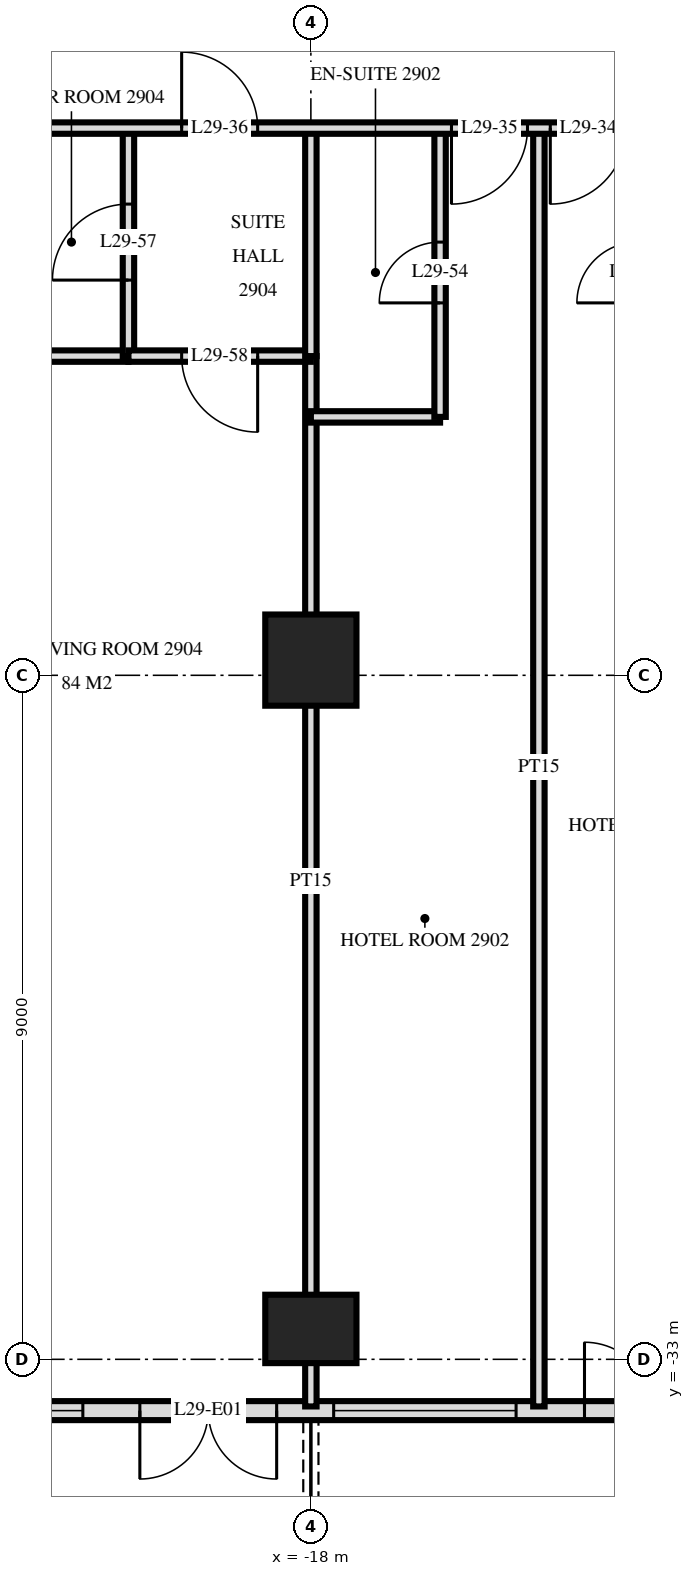
"""IFC4 building model, lengths in metres.
Left out: names, types, materials, properties, quantities, classifications, styles, units other than length and angle.
Written with IfcOpenShell. Run it as: python <this file> out.ifc"""

import sys

from ifc_helpers import new_model, si_unit, direction, frame, frame_2d, origin, origin_2d, place, context, subcontext, project, spatial, rectangle, extrude, element, fill, save


model = new_model("IFC4")
c1 = context("Model", 3, precision=1e-05, world=origin(), true_north=direction((0.0, 1.0)))
c2 = subcontext(c1, "Body", "Model", "MODEL_VIEW")
j1 = project(units=[si_unit("LENGTHUNIT", "METRE"), si_unit("PLANEANGLEUNIT", "RADIAN")], contexts=[c1])
p1 = place(None, origin())
s1 = spatial("IfcSite", under=j1, at=p1, CompositionType="ELEMENT")
p2 = place(p1, origin())
s2 = spatial("IfcBuilding", under=s1, at=p2, CompositionType="ELEMENT")
p3 = place(p2, frame((0.0, 0.0, 116.4)))
s3 = spatial("IfcBuildingStorey", under=s2, at=p3, CompositionType="ELEMENT", Elevation=116.4)
p4 = place(p3, frame((-18.0, -32.6, 0.0), z_axis=(0.0, 0.0, 1.0), x_axis=(1.0, 0.0, 0.0)))
e1 = element("IfcColumn", 1, at=p4, inside=s3, PredefinedType="COLUMN", context=c2, shape_type="SweptSolid", body=[
    extrude(rectangle(XDim=1.2, YDim=0.9, at=origin_2d()), origin(), (0.0, 0.0, 1.0), 3.6),
])
p5 = place(p3, frame((-18.0, -23.8, 0.0), z_axis=(0.0, 0.0, 1.0), x_axis=(1.0, 0.0, 0.0)))
e2 = element("IfcColumn", 2, at=p5, inside=s3, PredefinedType="COLUMN", context=c2, shape_type="SweptSolid", body=[
    extrude(rectangle(XDim=1.2, YDim=1.2, at=origin_2d()), origin(), (0.0, 0.0, 1.0), 3.6),
])
p6 = place(p3, frame((-23.675, -33.675, 0.0), z_axis=(0.0, 0.0, 1.0), x_axis=(1.0, 0.0, 0.0)))
e3 = element("IfcWall", 3, at=p6, inside=s3, PredefinedType="SOLIDWALL", context=c2, shape_type="SweptSolid", body=[
    extrude(rectangle(XDim=47.351, YDim=0.25, at=frame_2d((23.675, 0.0))), origin(), (0.0, 0.0, 1.0), 3.32),
])
p7 = place(p6, frame((0.275, 0.0, 0.3)))
e4 = element("IfcOpeningElement", 4, at=p7, cuts=e3, PredefinedType="OPENING", context=c2, shape_type="SweptSolid", body=[
    extrude(rectangle(XDim=2.4, YDim=2.1, at=frame_2d((1.2, 1.05))), frame((0.0, 0.135, 0.0), z_axis=(0.0, -1.0, 0.0), x_axis=(1.0, 0.0, 0.0)), (0.0, 0.0, 1.0), 0.27),
])
p8 = place(p6, frame((3.425, 0.0, 0.0)))
e5 = element("IfcOpeningElement", 5, at=p8, cuts=e3, PredefinedType="OPENING", context=c2, shape_type="SweptSolid", body=[
    extrude(rectangle(XDim=1.8, YDim=2.4, at=frame_2d((0.9, 1.2))), frame((0.0, 0.135, 0.0), z_axis=(0.0, -1.0, 0.0), x_axis=(1.0, 0.0, 0.0)), (0.0, 0.0, 1.0), 0.27),
])
p9 = place(p6, frame((5.975, 0.0, 0.3)))
e6 = element("IfcOpeningElement", 6, at=p9, cuts=e3, PredefinedType="OPENING", context=c2, shape_type="SweptSolid", body=[
    extrude(rectangle(XDim=2.4, YDim=2.1, at=frame_2d((1.2, 1.05))), frame((0.0, 0.135, 0.0), z_axis=(0.0, -1.0, 0.0), x_axis=(1.0, 0.0, 0.0)), (0.0, 0.0, 1.0), 0.27),
])
p10 = place(p6, frame((9.275, 0.0, 0.0)))
e7 = element("IfcOpeningElement", 7, at=p10, cuts=e3, PredefinedType="OPENING", context=c2, shape_type="SweptSolid", body=[
    extrude(rectangle(XDim=1.8, YDim=2.4, at=frame_2d((0.9, 1.2))), frame((0.0, 0.135, 0.0), z_axis=(0.0, -1.0, 0.0), x_axis=(1.0, 0.0, 0.0)), (0.0, 0.0, 1.0), 0.27),
])
p11 = place(p6, frame((12.275, 0.0, 0.0)))
e8 = element("IfcOpeningElement", 8, at=p11, cuts=e3, PredefinedType="OPENING", context=c2, shape_type="SweptSolid", body=[
    extrude(rectangle(XDim=1.8, YDim=2.4, at=frame_2d((0.9, 1.2))), frame((0.0, 0.135, 0.0), z_axis=(0.0, -1.0, 0.0), x_axis=(1.0, 0.0, 0.0)), (0.0, 0.0, 1.0), 0.27),
])
p12 = place(p6, frame((14.975, 0.0, 0.3)))
e9 = element("IfcOpeningElement", 9, at=p12, cuts=e3, PredefinedType="OPENING", context=c2, shape_type="SweptSolid", body=[
    extrude(rectangle(XDim=2.4, YDim=2.1, at=frame_2d((1.2, 1.05))), frame((0.0, 0.135, 0.0), z_axis=(0.0, -1.0, 0.0), x_axis=(1.0, 0.0, 0.0)), (0.0, 0.0, 1.0), 0.27),
])
p13 = place(p6, frame((17.975, 0.0, 0.3)))
e10 = element("IfcOpeningElement", 10, at=p13, cuts=e3, PredefinedType="OPENING", context=c2, shape_type="SweptSolid", body=[
    extrude(rectangle(XDim=2.4, YDim=2.1, at=frame_2d((1.2, 1.05))), frame((0.0, 0.135, 0.0), z_axis=(0.0, -1.0, 0.0), x_axis=(1.0, 0.0, 0.0)), (0.0, 0.0, 1.0), 0.27),
])
p14 = place(p6, frame((21.275, 0.0, 0.0)))
e11 = element("IfcOpeningElement", 11, at=p14, cuts=e3, PredefinedType="OPENING", context=c2, shape_type="SweptSolid", body=[
    extrude(rectangle(XDim=1.8, YDim=2.4, at=frame_2d((0.9, 1.2))), frame((0.0, 0.135, 0.0), z_axis=(0.0, -1.0, 0.0), x_axis=(1.0, 0.0, 0.0)), (0.0, 0.0, 1.0), 0.27),
])
p15 = place(p6, frame((24.275, 0.0, 0.0)))
e12 = element("IfcOpeningElement", 12, at=p15, cuts=e3, PredefinedType="OPENING", context=c2, shape_type="SweptSolid", body=[
    extrude(rectangle(XDim=1.8, YDim=2.4, at=frame_2d((0.9, 1.2))), frame((0.0, 0.135, 0.0), z_axis=(0.0, -1.0, 0.0), x_axis=(1.0, 0.0, 0.0)), (0.0, 0.0, 1.0), 0.27),
])
p16 = place(p6, frame((26.975, 0.0, 0.3)))
e13 = element("IfcOpeningElement", 13, at=p16, cuts=e3, PredefinedType="OPENING", context=c2, shape_type="SweptSolid", body=[
    extrude(rectangle(XDim=2.4, YDim=2.1, at=frame_2d((1.2, 1.05))), frame((0.0, 0.135, 0.0), z_axis=(0.0, -1.0, 0.0), x_axis=(1.0, 0.0, 0.0)), (0.0, 0.0, 1.0), 0.27),
])
p17 = place(p6, frame((30.275, 0.0, 0.0)))
e14 = element("IfcOpeningElement", 14, at=p17, cuts=e3, PredefinedType="OPENING", context=c2, shape_type="SweptSolid", body=[
    extrude(rectangle(XDim=1.8, YDim=2.4, at=frame_2d((0.9, 1.2))), frame((0.0, 0.135, 0.0), z_axis=(0.0, -1.0, 0.0), x_axis=(1.0, 0.0, 0.0)), (0.0, 0.0, 1.0), 0.27),
])
p18 = place(p6, frame((32.975, 0.0, 0.3)))
e15 = element("IfcOpeningElement", 15, at=p18, cuts=e3, PredefinedType="OPENING", context=c2, shape_type="SweptSolid", body=[
    extrude(rectangle(XDim=2.4, YDim=2.1, at=frame_2d((1.2, 1.05))), frame((0.0, 0.135, 0.0), z_axis=(0.0, -1.0, 0.0), x_axis=(1.0, 0.0, 0.0)), (0.0, 0.0, 1.0), 0.27),
])
p19 = place(p6, frame((35.975, 0.0, 0.3)))
e16 = element("IfcOpeningElement", 16, at=p19, cuts=e3, PredefinedType="OPENING", context=c2, shape_type="SweptSolid", body=[
    extrude(rectangle(XDim=2.4, YDim=2.1, at=frame_2d((1.2, 1.05))), frame((0.0, 0.135, 0.0), z_axis=(0.0, -1.0, 0.0), x_axis=(1.0, 0.0, 0.0)), (0.0, 0.0, 1.0), 0.27),
])
p20 = place(p6, frame((39.275, 0.0, 0.0)))
e17 = element("IfcOpeningElement", 17, at=p20, cuts=e3, PredefinedType="OPENING", context=c2, shape_type="SweptSolid", body=[
    extrude(rectangle(XDim=1.8, YDim=2.4, at=frame_2d((0.9, 1.2))), frame((0.0, 0.135, 0.0), z_axis=(0.0, -1.0, 0.0), x_axis=(1.0, 0.0, 0.0)), (0.0, 0.0, 1.0), 0.27),
])
p21 = place(p6, frame((41.975, 0.0, 0.3)))
e18 = element("IfcOpeningElement", 18, at=p21, cuts=e3, PredefinedType="OPENING", context=c2, shape_type="SweptSolid", body=[
    extrude(rectangle(XDim=2.4, YDim=2.1, at=frame_2d((1.2, 1.05))), frame((0.0, 0.135, 0.0), z_axis=(0.0, -1.0, 0.0), x_axis=(1.0, 0.0, 0.0)), (0.0, 0.0, 1.0), 0.27),
])
p22 = place(p6, frame((45.125, 0.0, 0.0)))
e19 = element("IfcOpeningElement", 19, at=p22, cuts=e3, PredefinedType="OPENING", context=c2, shape_type="SweptSolid", body=[
    extrude(rectangle(XDim=1.8, YDim=2.4, at=frame_2d((0.9, 1.2))), frame((0.0, 0.135, 0.0), z_axis=(0.0, -1.0, 0.0), x_axis=(1.0, 0.0, 0.0)), (0.0, 0.0, 1.0), 0.27),
])
p23 = place(p3, frame((-15.0, -33.62, 0.0), z_axis=(0.0, 0.0, 1.0), x_axis=(0.0, 1.0, 0.0)))
e20 = element("IfcWall", 20, at=p23, inside=s3, PredefinedType="PARTITIONING", context=c2, shape_type="SweptSolid", body=[
    extrude(rectangle(XDim=16.82, YDim=0.15, at=frame_2d((8.41, 0.0))), origin(), (0.0, 0.0, 1.0), 3.32),
])
p24 = place(p3, frame((-16.3, -20.6, 0.0), z_axis=(0.0, 0.0, 1.0), x_axis=(0.0, 1.0, 0.0)))
e21 = element("IfcWall", 21, at=p24, inside=s3, PredefinedType="PARTITIONING", context=c2, shape_type="SweptSolid", body=[
    extrude(rectangle(XDim=3.8, YDim=0.15, at=frame_2d((1.9, 0.0))), origin(), (0.0, 0.0, 1.0), 3.32),
])
p25 = place(p24, frame((1.5, 0.0, 0.0)))
e22 = element("IfcOpeningElement", 22, at=p25, cuts=e21, PredefinedType="OPENING", context=c2, shape_type="SweptSolid", body=[
    extrude(rectangle(XDim=0.8, YDim=2.1, at=frame_2d((0.4, 1.05))), frame((0.0, 0.085, 0.0), z_axis=(0.0, -1.0, 0.0), x_axis=(1.0, 0.0, 0.0)), (0.0, 0.0, 1.0), 0.17),
])
p26 = place(p3, frame((-18.0, -19.8, 0.0), z_axis=(0.0, 0.0, 1.0), x_axis=(0.0, 1.0, 0.0)))
e23 = element("IfcWall", 23, at=p26, inside=s3, PredefinedType="PARTITIONING", context=c2, shape_type="SweptSolid", body=[
    extrude(rectangle(XDim=3.0, YDim=0.15, at=frame_2d((1.5, 0.0))), origin(), (0.0, 0.0, 1.0), 3.32),
])
p27 = place(p3, frame((-18.0, -33.62, 0.0), z_axis=(0.0, 0.0, 1.0), x_axis=(0.0, 1.0, 0.0)))
e24 = element("IfcWall", 24, at=p27, inside=s3, PredefinedType="PARTITIONING", context=c2, shape_type="SweptSolid", body=[
    extrude(rectangle(XDim=13.82, YDim=0.15, at=frame_2d((6.91, 0.0))), origin(), (0.0, 0.0, 1.0), 3.32),
])
p28 = place(p3, frame((-20.4, -19.8, 0.0), z_axis=(0.0, 0.0, 1.0), x_axis=(0.0, 1.0, 0.0)))
e25 = element("IfcWall", 25, at=p28, inside=s3, PredefinedType="PARTITIONING", context=c2, shape_type="SweptSolid", body=[
    extrude(rectangle(XDim=3.0, YDim=0.15, at=frame_2d((1.5, 0.0))), origin(), (0.0, 0.0, 1.0), 3.32),
])
p29 = place(p28, frame((1.0, 0.0, 0.0)))
e26 = element("IfcOpeningElement", 26, at=p29, cuts=e25, PredefinedType="OPENING", context=c2, shape_type="SweptSolid", body=[
    extrude(rectangle(XDim=1.0, YDim=2.1, at=frame_2d((0.5, 1.05))), frame((0.0, 0.085, 0.0), z_axis=(0.0, -1.0, 0.0), x_axis=(1.0, 0.0, 0.0)), (0.0, 0.0, 1.0), 0.17),
])
p30 = place(p3, frame((-18.0, -20.6, 0.0), z_axis=(0.0, 0.0, 1.0), x_axis=(1.0, 0.0, 0.0)))
e27 = element("IfcWall", 27, at=p30, inside=s3, PredefinedType="PARTITIONING", context=c2, shape_type="SweptSolid", body=[
    extrude(rectangle(XDim=1.7, YDim=0.15, at=frame_2d((0.85, 0.0))), origin(), (0.0, 0.0, 1.0), 3.32),
])
p31 = place(p3, frame((-20.4, -19.8, 0.0), z_axis=(0.0, 0.0, 1.0), x_axis=(1.0, 0.0, 0.0)))
e28 = element("IfcWall", 28, at=p31, inside=s3, PredefinedType="PARTITIONING", context=c2, shape_type="SweptSolid", body=[
    extrude(rectangle(XDim=2.4, YDim=0.15, at=frame_2d((1.2, 0.0))), origin(), (0.0, 0.0, 1.0), 3.32),
])
p32 = place(p31, frame((0.7, 0.0, 0.0)))
e29 = element("IfcOpeningElement", 29, at=p32, cuts=e28, PredefinedType="OPENING", context=c2, shape_type="SweptSolid", body=[
    extrude(rectangle(XDim=1.0, YDim=2.1, at=frame_2d((0.5, 1.05))), frame((0.0, 0.085, 0.0), z_axis=(0.0, -1.0, 0.0), x_axis=(1.0, 0.0, 0.0)), (0.0, 0.0, 1.0), 0.17),
])
p33 = place(p3, frame((-21.9, -19.8, 0.0), z_axis=(0.0, 0.0, 1.0), x_axis=(1.0, 0.0, 0.0)))
e30 = element("IfcWall", 30, at=p33, inside=s3, PredefinedType="PLUMBINGWALL", context=c2, shape_type="SweptSolid", body=[
    extrude(rectangle(XDim=1.5, YDim=0.15, at=frame_2d((0.75, 0.0))), origin(), (0.0, 0.0, 1.0), 3.32),
])
p34 = place(p3, frame((-28.02, -16.8, 0.0), z_axis=(0.0, 0.0, 1.0), x_axis=(1.0, 0.0, 0.0)))
e31 = element("IfcWall", 31, at=p34, inside=s3, PredefinedType="PARTITIONING", context=c2, shape_type="SweptSolid", body=[
    extrude(rectangle(XDim=56.04, YDim=0.15, at=frame_2d((28.02, 0.0))), origin(), (0.0, 0.0, 1.0), 3.32),
])
p35 = place(p34, frame((13.17, 0.0, 0.0)))
e32 = element("IfcOpeningElement", 32, at=p35, cuts=e31, PredefinedType="OPENING", context=c2, shape_type="SweptSolid", body=[
    extrude(rectangle(XDim=1.0, YDim=2.1, at=frame_2d((0.5, 1.05))), frame((0.0, 0.085, 0.0), z_axis=(0.0, -1.0, 0.0), x_axis=(1.0, 0.0, 0.0)), (0.0, 0.0, 1.0), 0.17),
])
p36 = place(p34, frame((11.87, 0.0, 0.0)))
e33 = element("IfcOpeningElement", 33, at=p36, cuts=e31, PredefinedType="OPENING", context=c2, shape_type="SweptSolid", body=[
    extrude(rectangle(XDim=1.0, YDim=2.1, at=frame_2d((0.5, 1.05))), frame((0.0, 0.085, 0.0), z_axis=(0.0, -1.0, 0.0), x_axis=(1.0, 0.0, 0.0)), (0.0, 0.0, 1.0), 0.17),
])
p37 = place(p34, frame((8.32, 0.0, 0.0)))
e34 = element("IfcOpeningElement", 34, at=p37, cuts=e31, PredefinedType="OPENING", context=c2, shape_type="SweptSolid", body=[
    extrude(rectangle(XDim=1.0, YDim=2.1, at=frame_2d((0.5, 1.05))), frame((0.0, 0.085, 0.0), z_axis=(0.0, -1.0, 0.0), x_axis=(1.0, 0.0, 0.0)), (0.0, 0.0, 1.0), 0.17),
])
p38 = place(p34, frame((40.42, 0.0, 0.0)))
e35 = element("IfcOpeningElement", 35, at=p38, cuts=e31, PredefinedType="OPENING", context=c2, shape_type="SweptSolid", body=[
    extrude(rectangle(XDim=1.0, YDim=2.1, at=frame_2d((0.5, 1.05))), frame((0.0, 0.085, 0.0), z_axis=(0.0, -1.0, 0.0), x_axis=(1.0, 0.0, 0.0)), (0.0, 0.0, 1.0), 0.17),
])
p39 = place(p34, frame((46.72, 0.0, 0.0)))
e36 = element("IfcOpeningElement", 36, at=p39, cuts=e31, PredefinedType="OPENING", context=c2, shape_type="SweptSolid", body=[
    extrude(rectangle(XDim=1.0, YDim=2.1, at=frame_2d((0.5, 1.05))), frame((0.0, 0.085, 0.0), z_axis=(0.0, -1.0, 0.0), x_axis=(1.0, 0.0, 0.0)), (0.0, 0.0, 1.0), 0.17),
])
p40 = place(p34, frame((21.52, 0.0, 0.0)))
e37 = element("IfcOpeningElement", 37, at=p40, cuts=e31, PredefinedType="OPENING", context=c2, shape_type="SweptSolid", body=[
    extrude(rectangle(XDim=1.0, YDim=2.1, at=frame_2d((0.5, 1.05))), frame((0.0, 0.085, 0.0), z_axis=(0.0, -1.0, 0.0), x_axis=(1.0, 0.0, 0.0)), (0.0, 0.0, 1.0), 0.17),
])
p41 = place(p34, frame((30.52, 0.0, 0.0)))
e38 = element("IfcOpeningElement", 38, at=p41, cuts=e31, PredefinedType="OPENING", context=c2, shape_type="SweptSolid", body=[
    extrude(rectangle(XDim=1.0, YDim=2.1, at=frame_2d((0.5, 1.05))), frame((0.0, 0.085, 0.0), z_axis=(0.0, -1.0, 0.0), x_axis=(1.0, 0.0, 0.0)), (0.0, 0.0, 1.0), 0.17),
])
p42 = place(p34, frame((36.52, 0.0, 0.0)))
e39 = element("IfcOpeningElement", 39, at=p42, cuts=e31, PredefinedType="OPENING", context=c2, shape_type="SweptSolid", body=[
    extrude(rectangle(XDim=1.0, YDim=2.1, at=frame_2d((0.5, 1.05))), frame((0.0, 0.085, 0.0), z_axis=(0.0, -1.0, 0.0), x_axis=(1.0, 0.0, 0.0)), (0.0, 0.0, 1.0), 0.17),
])
p43 = place(p7, origin())
e40 = element("IfcWindow", 40, at=p43, inside=s3, PartitioningType="SINGLE_PANEL", PredefinedType="WINDOW", context=c2, shape_type="SweptSolid", body=[
    extrude(rectangle(XDim=2.4, YDim=2.1, at=frame_2d((1.2, 1.05))), frame((0.0, 0.03, 0.0), z_axis=(0.0, -1.0, 0.0), x_axis=(1.0, 0.0, 0.0)), (0.0, 0.0, 1.0), 0.06),
])
fill(e4, e40)
p44 = place(p8, frame((0.9, 0.0, 0.0), z_axis=(0.0, 0.0, 1.0), x_axis=(-1.0, 0.0, 0.0)))
e41 = element("IfcDoor", 41, at=p44, inside=s3, OperationType="DOUBLE_DOOR_SINGLE_SWING", PredefinedType="DOOR", context=c2, shape_type="SweptSolid", body=[
    extrude(rectangle(XDim=1.8, YDim=2.4, at=frame_2d((0.0, 1.2))), frame((0.0, -0.025, 0.0), z_axis=(0.0, 1.0, 0.0), x_axis=(-1.0, 0.0, 0.0)), (0.0, 0.0, 1.0), 0.05),
])
fill(e5, e41)
p45 = place(p9, origin())
e42 = element("IfcWindow", 42, at=p45, inside=s3, PartitioningType="SINGLE_PANEL", PredefinedType="WINDOW", context=c2, shape_type="SweptSolid", body=[
    extrude(rectangle(XDim=2.4, YDim=2.1, at=frame_2d((1.2, 1.05))), frame((0.0, 0.03, 0.0), z_axis=(0.0, -1.0, 0.0), x_axis=(1.0, 0.0, 0.0)), (0.0, 0.0, 1.0), 0.06),
])
fill(e6, e42)
p46 = place(p10, origin())
e43 = element("IfcDoor", 43, at=p46, inside=s3, OperationType="DOUBLE_DOOR_SINGLE_SWING", PredefinedType="DOOR", context=c2, shape_type="SweptSolid", body=[
    extrude(rectangle(XDim=1.8, YDim=2.4, at=frame_2d((0.9, 1.2))), frame((0.0, 0.025, 0.0), z_axis=(0.0, -1.0, 0.0), x_axis=(1.0, 0.0, 0.0)), (0.0, 0.0, 1.0), 0.05),
])
fill(e7, e43)
p47 = place(p35, frame((0.5, 0.0, 0.0), z_axis=(0.0, 0.0, 1.0), x_axis=(-1.0, 0.0, 0.0)))
e44 = element("IfcDoor", 44, at=p47, inside=s3, OperationType="SINGLE_SWING_LEFT", PredefinedType="DOOR", context=c2, shape_type="SweptSolid", body=[
    extrude(rectangle(XDim=1.0, YDim=2.1, at=frame_2d((0.0, 1.05))), frame((0.0, -0.025, 0.0), z_axis=(0.0, 1.0, 0.0), x_axis=(-1.0, 0.0, 0.0)), (0.0, 0.0, 1.0), 0.05),
])
fill(e32, e44)
p48 = place(p36, frame((0.5, 0.0, 0.0), z_axis=(0.0, 0.0, 1.0), x_axis=(-1.0, 0.0, 0.0)))
e45 = element("IfcDoor", 45, at=p48, inside=s3, OperationType="SINGLE_SWING_LEFT", PredefinedType="DOOR", context=c2, shape_type="SweptSolid", body=[
    extrude(rectangle(XDim=1.0, YDim=2.1, at=frame_2d((0.0, 1.05))), frame((0.0, -0.025, 0.0), z_axis=(0.0, 1.0, 0.0), x_axis=(-1.0, 0.0, 0.0)), (0.0, 0.0, 1.0), 0.05),
])
fill(e33, e45)
p49 = place(p37, origin())
e46 = element("IfcDoor", 46, at=p49, inside=s3, OperationType="SINGLE_SWING_RIGHT", PredefinedType="DOOR", context=c2, shape_type="SweptSolid", body=[
    extrude(rectangle(XDim=1.0, YDim=2.1, at=frame_2d((0.5, 1.05))), frame((0.0, 0.025, 0.0), z_axis=(0.0, -1.0, 0.0), x_axis=(1.0, 0.0, 0.0)), (0.0, 0.0, 1.0), 0.05),
])
fill(e34, e46)
p50 = place(p25, origin())
e47 = element("IfcDoor", 47, at=p50, inside=s3, OperationType="SINGLE_SWING_RIGHT", PredefinedType="DOOR", context=c2, shape_type="SweptSolid", body=[
    extrude(rectangle(XDim=0.8, YDim=2.1, at=frame_2d((0.4, 1.05))), frame((0.0, 0.025, 0.0), z_axis=(0.0, -1.0, 0.0), x_axis=(1.0, 0.0, 0.0)), (0.0, 0.0, 1.0), 0.05),
])
fill(e22, e47)
p51 = place(p29, origin())
e48 = element("IfcDoor", 48, at=p51, inside=s3, OperationType="SINGLE_SWING_RIGHT", PredefinedType="DOOR", context=c2, shape_type="SweptSolid", body=[
    extrude(rectangle(XDim=1.0, YDim=2.1, at=frame_2d((0.5, 1.05))), frame((0.0, 0.025, 0.0), z_axis=(0.0, -1.0, 0.0), x_axis=(1.0, 0.0, 0.0)), (0.0, 0.0, 1.0), 0.05),
])
fill(e26, e48)
p52 = place(p32, frame((0.5, 0.0, 0.0), z_axis=(0.0, 0.0, 1.0), x_axis=(-1.0, 0.0, 0.0)))
e49 = element("IfcDoor", 49, at=p52, inside=s3, OperationType="SINGLE_SWING_RIGHT", PredefinedType="DOOR", context=c2, shape_type="SweptSolid", body=[
    extrude(rectangle(XDim=1.0, YDim=2.1, at=frame_2d((0.0, 1.05))), frame((0.0, -0.025, 0.0), z_axis=(0.0, 1.0, 0.0), x_axis=(-1.0, 0.0, 0.0)), (0.0, 0.0, 1.0), 0.05),
])
fill(e29, e49)
save(model, sys.argv[1])
